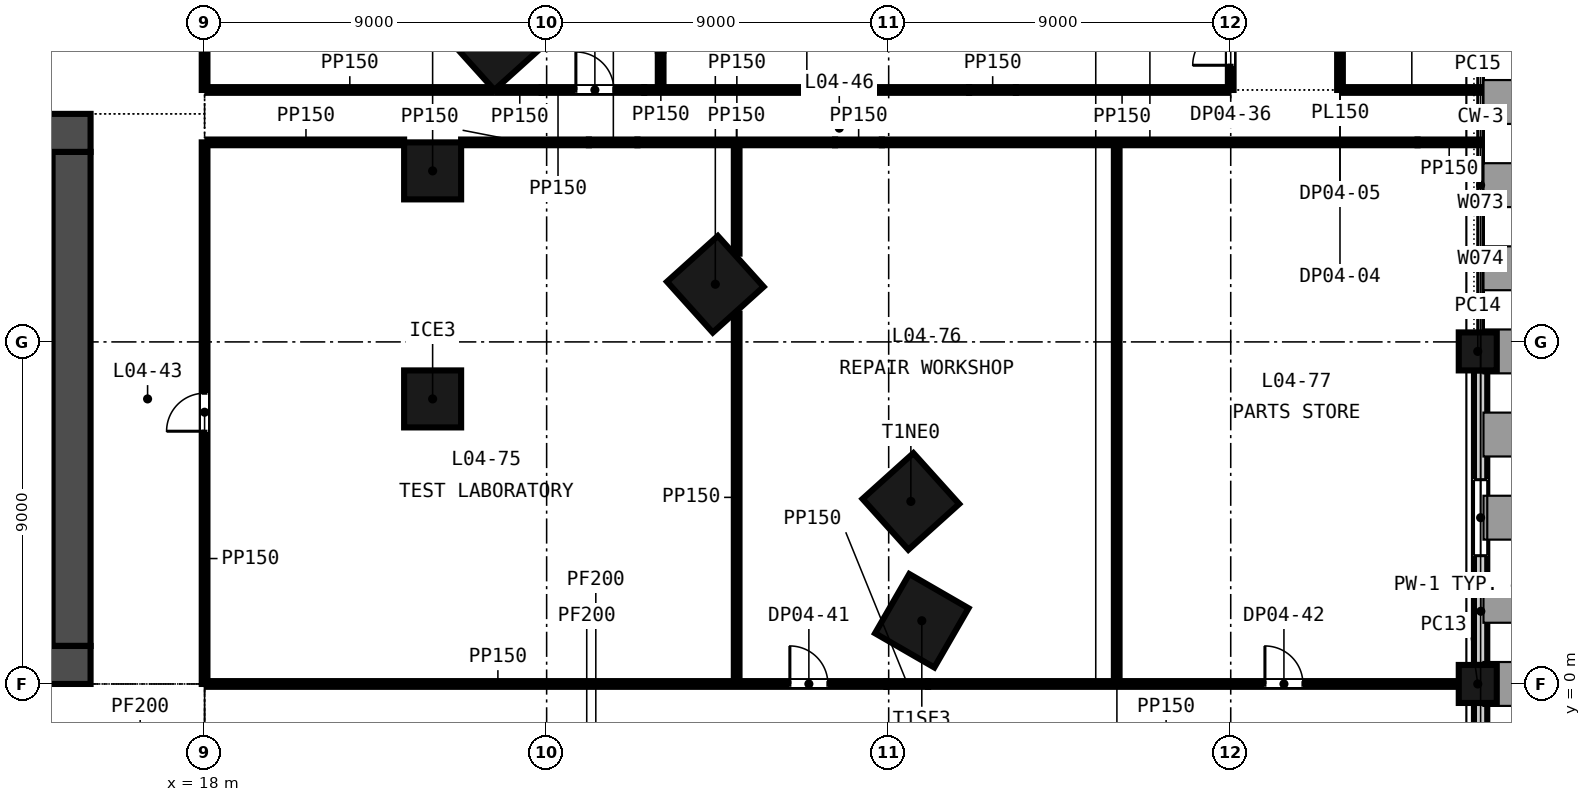
"""IFC4 building model, lengths in metres.
Left out: names, types, materials, properties, quantities, classifications, styles, units other than length and angle.
Written with IfcOpenShell. Run it as: python <this file> out.ifc"""

import sys

from ifc_helpers import new_model, si_unit, direction, frame, frame_2d, origin, origin_2d, place, context, subcontext, project, spatial, rectangle, extrude, element, fill, save


model = new_model("IFC4")
c1 = context("Model", 3, precision=1e-05, world=origin(), true_north=direction((0.0, 1.0)))
c2 = subcontext(c1, "Body", "Model", "MODEL_VIEW")
j1 = project(units=[si_unit("LENGTHUNIT", "METRE"), si_unit("PLANEANGLEUNIT", "RADIAN")], contexts=[c1])
p1 = place(None, origin())
s1 = spatial("IfcSite", under=j1, at=p1, CompositionType="ELEMENT")
p2 = place(p1, origin())
s2 = spatial("IfcBuilding", under=s1, at=p2, CompositionType="ELEMENT")
p3 = place(p2, frame((0.0, 0.0, 27.0)))
s3 = spatial("IfcBuildingStorey", under=s2, at=p3, CompositionType="ELEMENT", Elevation=27.0)
p4 = place(p3, frame((-15.0, 0.5, -0.3), z_axis=(0.0, 0.0, 1.0), x_axis=(1.0, 0.0, 0.0)))
e1 = element("IfcWall", 1, at=p4, inside=s3, PredefinedType="SOLIDWALL", context=c2, shape_type="SweptSolid", body=[
    extrude(rectangle(XDim=30.0, YDim=1.0, at=frame_2d((15.0, 0.0))), origin(), (0.0, 0.0, 1.0), 4.5),
])
p5 = place(p4, frame((5.8, 0.0, 0.3)))
e2 = element("IfcOpeningElement", 2, at=p5, cuts=e1, PredefinedType="OPENING", context=c2, shape_type="SweptSolid", body=[
    extrude(rectangle(XDim=2.4, YDim=2.4, at=frame_2d((1.2, 1.2))), frame((0.0, 0.51, 0.0), z_axis=(0.0, -1.0, 0.0), x_axis=(1.0, 0.0, 0.0)), (0.0, 0.0, 1.0), 1.02),
])
p6 = place(p4, frame((13.8, 0.0, 0.3)))
e3 = element("IfcOpeningElement", 3, at=p6, cuts=e1, PredefinedType="OPENING", context=c2, shape_type="SweptSolid", body=[
    extrude(rectangle(XDim=2.4, YDim=2.4, at=frame_2d((1.2, 1.2))), frame((0.0, 0.51, 0.0), z_axis=(0.0, -1.0, 0.0), x_axis=(1.0, 0.0, 0.0)), (0.0, 0.0, 1.0), 1.02),
])
p7 = place(p4, frame((21.8, 0.0, 0.3)))
e4 = element("IfcOpeningElement", 4, at=p7, cuts=e1, PredefinedType="OPENING", context=c2, shape_type="SweptSolid", body=[
    extrude(rectangle(XDim=2.4, YDim=2.4, at=frame_2d((1.2, 1.2))), frame((0.0, 0.51, 0.0), z_axis=(0.0, -1.0, 0.0), x_axis=(1.0, 0.0, 0.0)), (0.0, 0.0, 1.0), 1.02),
])
p8 = place(p4, frame((1.5, 0.0, 0.3)))
e5 = element("IfcOpeningElement", 5, at=p8, cuts=e1, PredefinedType="OPENING", context=c2, shape_type="SweptSolid", body=[
    extrude(rectangle(XDim=1.2, YDim=2.1, at=frame_2d((0.6, 1.05))), frame((0.0, 0.51, 0.0), z_axis=(0.0, -1.0, 0.0), x_axis=(1.0, 0.0, 0.0)), (0.0, 0.0, 1.0), 1.02),
])
p9 = place(p4, frame((27.3, 0.0, 0.3)))
e6 = element("IfcOpeningElement", 6, at=p9, cuts=e1, PredefinedType="OPENING", context=c2, shape_type="SweptSolid", body=[
    extrude(rectangle(XDim=1.2, YDim=2.1, at=frame_2d((0.6, 1.05))), frame((0.0, 0.51, 0.0), z_axis=(0.0, -1.0, 0.0), x_axis=(1.0, 0.0, 0.0)), (0.0, 0.0, 1.0), 1.02),
])
p10 = place(p3, frame((-15.0, 14.5, -0.3), z_axis=(0.0, 0.0, 1.0), x_axis=(1.0, 0.0, 0.0)))
e7 = element("IfcWall", 7, at=p10, inside=s3, PredefinedType="SOLIDWALL", context=c2, shape_type="SweptSolid", body=[
    extrude(rectangle(XDim=30.0, YDim=1.0, at=frame_2d((15.0, 0.0))), origin(), (0.0, 0.0, 1.0), 4.5),
])
p11 = place(p10, frame((9.25, 0.0, 0.3)))
e8 = element("IfcOpeningElement", 8, at=p11, cuts=e7, PredefinedType="OPENING", context=c2, shape_type="SweptSolid", body=[
    extrude(rectangle(XDim=1.5, YDim=2.1, at=frame_2d((0.75, 1.05))), frame((0.0, 0.51, 0.0), z_axis=(0.0, -1.0, 0.0), x_axis=(1.0, 0.0, 0.0)), (0.0, 0.0, 1.0), 1.02),
])
p12 = place(p10, frame((19.4, 0.0, 0.3)))
e9 = element("IfcOpeningElement", 9, at=p12, cuts=e7, PredefinedType="OPENING", context=c2, shape_type="SweptSolid", body=[
    extrude(rectangle(XDim=1.5, YDim=2.1, at=frame_2d((0.75, 1.05))), frame((0.0, 0.51, 0.0), z_axis=(0.0, -1.0, 0.0), x_axis=(1.0, 0.0, 0.0)), (0.0, 0.0, 1.0), 1.02),
])
p13 = place(p10, frame((1.5, 0.0, 0.3)))
e10 = element("IfcOpeningElement", 10, at=p13, cuts=e7, PredefinedType="OPENING", context=c2, shape_type="SweptSolid", body=[
    extrude(rectangle(XDim=1.2, YDim=2.1, at=frame_2d((0.6, 1.05))), frame((0.0, 0.51, 0.0), z_axis=(0.0, -1.0, 0.0), x_axis=(1.0, 0.0, 0.0)), (0.0, 0.0, 1.0), 1.02),
])
p14 = place(p10, frame((27.3, 0.0, 0.3)))
e11 = element("IfcOpeningElement", 11, at=p14, cuts=e7, PredefinedType="OPENING", context=c2, shape_type="SweptSolid", body=[
    extrude(rectangle(XDim=1.2, YDim=2.1, at=frame_2d((0.6, 1.05))), frame((0.0, 0.51, 0.0), z_axis=(0.0, -1.0, 0.0), x_axis=(1.0, 0.0, 0.0)), (0.0, 0.0, 1.0), 1.02),
])
p15 = place(p3, frame((14.5, 1.0, -0.3), z_axis=(0.0, 0.0, 1.0), x_axis=(0.0, 1.0, 0.0)))
e12 = element("IfcWall", 12, at=p15, inside=s3, PredefinedType="SOLIDWALL", context=c2, shape_type="SweptSolid", body=[
    extrude(rectangle(XDim=13.0, YDim=1.0, at=frame_2d((6.5, 0.0))), origin(), (0.0, 0.0, 1.0), 4.5),
])
for number, where, z_axis, x_axis in (
    (13, (36.872, 1.663, -0.3), (0.0, 0.0, 1.0), (0.5, 0.866, 0.0)),
    (14, (36.584, 4.803, -0.3), (0.0, 0.0, 1.0), (-0.669, 0.743, 0.0)),
    (15, (31.438, 10.517, -0.3), (0.0, 0.0, 1.0), (-0.669, 0.743, 0.0)),
    (16, (25.691, 16.9, -0.3), (0.0, 0.0, 1.0), (-0.669, 0.743, 0.0)),
):
    element("IfcColumn", number, at=place(p3, frame(where, z_axis=z_axis, x_axis=x_axis)), inside=s3, PredefinedType="COLUMN", context=c2, shape_type="SweptSolid", body=[
        extrude(rectangle(XDim=1.8, YDim=1.8, at=origin_2d()), origin(), (0.0, 0.0, 1.0), 4.5),
    ])
for number, where, z_axis, x_axis in (
    (17, (24.0, 7.5, -0.3), (0.0, 0.0, 1.0), (1.0, 0.0, 0.0)),
    (18, (24.0, 13.5, -0.3), (0.0, 0.0, 1.0), (1.0, 0.0, 0.0)),
):
    element("IfcColumn", number, at=place(p3, frame(where, z_axis=z_axis, x_axis=x_axis)), inside=s3, PredefinedType="COLUMN", context=c2, shape_type="SweptSolid", body=[
        extrude(rectangle(XDim=1.5, YDim=1.5, at=origin_2d()), origin(), (0.0, 0.0, 1.0), 4.5),
    ])
for number, where, z_axis, x_axis in (
    (19, (51.5, 0.0, -0.3), (0.0, 0.0, 1.0), (0.0, 1.0, 0.0)),
    (20, (51.5, 8.75, -0.3), (0.0, 0.0, 1.0), (0.0, 1.0, 0.0)),
):
    element("IfcColumn", number, at=place(p3, frame(where, z_axis=z_axis, x_axis=x_axis)), inside=s3, PredefinedType="COLUMN", context=c2, shape_type="SweptSolid", body=[
        extrude(rectangle(XDim=1.0, YDim=1.0, at=origin_2d()), origin(), (0.0, 0.0, 1.0), 4.5),
    ])
p16 = place(p3, frame((51.575, -8.2, -0.3), z_axis=(0.0, 0.0, 1.0), x_axis=(0.0, 1.0, 0.0)))
e21 = element("IfcWall", 21, at=p16, inside=s3, PredefinedType="SOLIDWALL", context=c2, shape_type="SweptSolid", body=[
    extrude(rectangle(XDim=7.7, YDim=0.35, at=frame_2d((3.85, 0.0))), origin(), (0.0, 0.0, 1.0), 3.6),
])
p17 = place(p16, frame((2.85, 0.0, 1.2)))
e22 = element("IfcOpeningElement", 22, at=p17, cuts=e21, PredefinedType="OPENING", context=c2, shape_type="SweptSolid", body=[
    extrude(rectangle(XDim=2.0, YDim=2.35, at=frame_2d((1.0, 1.175))), frame((0.0, 0.185, 0.0), z_axis=(0.0, -1.0, 0.0), x_axis=(1.0, 0.0, 0.0)), (0.0, 0.0, 1.0), 0.37),
])
p18 = place(p3, frame((51.575, 0.5, -0.3), z_axis=(0.0, 0.0, 1.0), x_axis=(0.0, 1.0, 0.0)))
e23 = element("IfcWall", 23, at=p18, inside=s3, PredefinedType="SOLIDWALL", context=c2, shape_type="SweptSolid", body=[
    extrude(rectangle(XDim=7.75, YDim=0.35, at=frame_2d((3.875, 0.0))), origin(), (0.0, 0.0, 1.0), 3.6),
])
p19 = place(p18, frame((2.875, 0.0, 1.2)))
e24 = element("IfcOpeningElement", 24, at=p19, cuts=e23, PredefinedType="OPENING", context=c2, shape_type="SweptSolid", body=[
    extrude(rectangle(XDim=2.0, YDim=2.35, at=frame_2d((1.0, 1.175))), frame((0.0, 0.185, 0.0), z_axis=(0.0, -1.0, 0.0), x_axis=(1.0, 0.0, 0.0)), (0.0, 0.0, 1.0), 0.37),
])
p20 = place(p3, frame((11.05, 7.35, -0.3), z_axis=(0.0, 0.0, 1.0), x_axis=(1.0, 0.0, 0.0)))
e25 = element("IfcWall", 25, at=p20, inside=s3, PredefinedType="SOLIDWALL", context=c2, shape_type="SweptSolid", body=[
    extrude(rectangle(XDim=2.95, YDim=0.3, at=frame_2d((1.475, 0.0))), origin(), (0.0, 0.0, 1.0), 4.5),
])
p21 = place(p3, frame((18.075, 0.0, 0.0), z_axis=(0.0, 0.0, 1.0), x_axis=(1.0, 0.0, 0.0)))
e26 = element("IfcWall", 26, at=p21, inside=s3, PredefinedType="PARTITIONING", context=c2, shape_type="SweptSolid", body=[
    extrude(rectangle(XDim=17.865, YDim=0.15, at=frame_2d((8.933, 0.0))), origin(), (0.0, 0.0, 1.0), 4.2),
])
p22 = place(p21, frame((15.325, 0.0, 0.0)))
e27 = element("IfcOpeningElement", 27, at=p22, cuts=e26, PredefinedType="OPENING", context=c2, shape_type="SweptSolid", body=[
    extrude(rectangle(XDim=1.0, YDim=2.1, at=frame_2d((0.5, 1.05))), frame((0.0, 0.085, 0.0), z_axis=(0.0, -1.0, 0.0), x_axis=(1.0, 0.0, 0.0)), (0.0, 0.0, 1.0), 0.17),
])
p23 = place(p3, frame((35.94, 0.0, 0.0), z_axis=(0.0, 0.0, 1.0), x_axis=(1.0, 0.0, 0.0)))
e28 = element("IfcWall", 28, at=p23, inside=s3, PredefinedType="PARTITIONING", context=c2, shape_type="SweptSolid", body=[
    extrude(rectangle(XDim=1.097, YDim=0.15, at=frame_2d((0.548, 0.0))), origin(), (0.0, 0.0, 1.0), 3.2),
])
p24 = place(p3, frame((37.037, 0.0, 0.0), z_axis=(0.0, 0.0, 1.0), x_axis=(1.0, 0.0, 0.0)))
e29 = element("IfcWall", 29, at=p24, inside=s3, PredefinedType="PARTITIONING", context=c2, shape_type="SweptSolid", body=[
    extrude(rectangle(XDim=13.963, YDim=0.15, at=frame_2d((6.981, 0.0))), origin(), (0.0, 0.0, 1.0), 4.2),
])
p25 = place(p24, frame((8.863, 0.0, 0.0)))
e30 = element("IfcOpeningElement", 30, at=p25, cuts=e29, PredefinedType="OPENING", context=c2, shape_type="SweptSolid", body=[
    extrude(rectangle(XDim=1.0, YDim=2.1, at=frame_2d((0.5, 1.05))), frame((0.0, 0.085, 0.0), z_axis=(0.0, -1.0, 0.0), x_axis=(1.0, 0.0, 0.0)), (0.0, 0.0, 1.0), 0.17),
])
p26 = place(p3, frame((18.075, 14.25, 0.0), z_axis=(0.0, 0.0, 1.0), x_axis=(1.0, 0.0, 0.0)))
e31 = element("IfcWall", 31, at=p26, inside=s3, PredefinedType="PARTITIONING", context=c2, shape_type="SweptSolid", body=[
    extrude(rectangle(XDim=5.175, YDim=0.15, at=frame_2d((2.587, 0.0))), origin(), (0.0, 0.0, 1.0), 4.2),
])
p27 = place(p3, frame((24.75, 14.25, 0.0), z_axis=(0.0, 0.0, 1.0), x_axis=(1.0, 0.0, 0.0)))
e32 = element("IfcWall", 32, at=p27, inside=s3, PredefinedType="PARTITIONING", context=c2, shape_type="SweptSolid", body=[
    extrude(rectangle(XDim=3.361, YDim=0.15, at=frame_2d((1.681, 0.0))), origin(), (0.0, 0.0, 1.0), 4.2),
])
p28 = place(p3, frame((28.111, 14.25, 0.0), z_axis=(0.0, 0.0, 1.0), x_axis=(1.0, 0.0, 0.0)))
e33 = element("IfcWall", 33, at=p28, inside=s3, PredefinedType="PARTITIONING", context=c2, shape_type="SweptSolid", body=[
    extrude(rectangle(XDim=1.278, YDim=0.15, at=frame_2d((0.639, 0.0))), origin(), (0.0, 0.0, 1.0), 3.2),
])
p29 = place(p3, frame((29.389, 14.25, 0.0), z_axis=(0.0, 0.0, 1.0), x_axis=(1.0, 0.0, 0.0)))
e34 = element("IfcWall", 34, at=p29, inside=s3, PredefinedType="PARTITIONING", context=c2, shape_type="SweptSolid", body=[
    extrude(rectangle(XDim=5.2, YDim=0.15, at=frame_2d((2.6, 0.0))), origin(), (0.0, 0.0, 1.0), 4.2),
])
p30 = place(p3, frame((34.589, 14.25, 0.0), z_axis=(0.0, 0.0, 1.0), x_axis=(1.0, 0.0, 0.0)))
e35 = element("IfcWall", 35, at=p30, inside=s3, PredefinedType="PARTITIONING", context=c2, shape_type="SweptSolid", body=[
    extrude(rectangle(XDim=1.231, YDim=0.15, at=frame_2d((0.616, 0.0))), origin(), (0.0, 0.0, 1.0), 3.219),
])
p31 = place(p3, frame((35.82, 14.25, 0.0), z_axis=(0.0, 0.0, 1.0), x_axis=(1.0, 0.0, 0.0)))
e36 = element("IfcWall", 36, at=p31, inside=s3, PredefinedType="PARTITIONING", context=c2, shape_type="SweptSolid", body=[
    extrude(rectangle(XDim=14.096, YDim=0.15, at=frame_2d((7.048, 0.0))), origin(), (0.0, 0.0, 1.0), 4.2),
])
p32 = place(p3, frame((49.916, 14.25, 0.0), z_axis=(0.0, 0.0, 1.0), x_axis=(1.0, 0.0, 0.0)))
e37 = element("IfcWall", 37, at=p32, inside=s3, PredefinedType="PARTITIONING", context=c2, shape_type="SweptSolid", body=[
    extrude(rectangle(XDim=1.654, YDim=0.15, at=frame_2d((0.827, 0.0))), origin(), (0.0, 0.0, 1.0), 3.298),
])
p33 = place(p3, frame((18.075, 15.629, 0.0), z_axis=(0.0, 0.0, 1.0), x_axis=(1.0, 0.0, 0.0)))
e38 = element("IfcWall", 38, at=p33, inside=s3, PredefinedType="PARTITIONING", context=c2, shape_type="SweptSolid", body=[
    extrude(rectangle(XDim=7.482, YDim=0.15, at=frame_2d((3.741, 0.0))), origin(), (0.0, 0.0, 1.0), 4.2),
])
p34 = place(p3, frame((25.708, 15.629, 0.0), z_axis=(0.0, 0.0, 1.0), x_axis=(1.0, 0.0, 0.0)))
e39 = element("IfcWall", 39, at=p34, inside=s3, PredefinedType="PARTITIONING", context=c2, shape_type="SweptSolid", body=[
    extrude(rectangle(XDim=1.162, YDim=0.15, at=frame_2d((0.581, 0.0))), origin(), (0.0, 0.0, 1.0), 4.2),
])
p35 = place(p3, frame((26.869, 15.629, 0.0), z_axis=(0.0, 0.0, 1.0), x_axis=(1.0, 0.0, 0.0)))
e40 = element("IfcWall", 40, at=p35, inside=s3, PredefinedType="PARTITIONING", context=c2, shape_type="SweptSolid", body=[
    extrude(rectangle(XDim=2.698, YDim=0.15, at=frame_2d((1.349, 0.0))), origin(), (0.0, 0.0, 1.0), 3.111),
])
p36 = place(p35, frame((0.9, 0.0, 0.0)))
e41 = element("IfcOpeningElement", 41, at=p36, cuts=e40, PredefinedType="OPENING", context=c2, shape_type="SweptSolid", body=[
    extrude(rectangle(XDim=1.0, YDim=2.1, at=frame_2d((0.5, 1.05))), frame((0.0, 0.085, 0.0), z_axis=(0.0, -1.0, 0.0), x_axis=(1.0, 0.0, 0.0)), (0.0, 0.0, 1.0), 0.17),
])
p37 = place(p3, frame((29.567, 15.629, 0.0), z_axis=(0.0, 0.0, 1.0), x_axis=(1.0, 0.0, 0.0)))
e42 = element("IfcWall", 42, at=p37, inside=s3, PredefinedType="PARTITIONING", context=c2, shape_type="SweptSolid", body=[
    extrude(rectangle(XDim=8.548, YDim=0.15, at=frame_2d((4.274, 0.0))), origin(), (0.0, 0.0, 1.0), 4.2),
])
p38 = place(p3, frame((38.116, 15.629, 0.0), z_axis=(0.0, 0.0, 1.0), x_axis=(1.0, 0.0, 0.0)))
e43 = element("IfcWall", 43, at=p38, inside=s3, PredefinedType="PARTITIONING", context=c2, shape_type="SweptSolid", body=[
    extrude(rectangle(XDim=1.231, YDim=0.15, at=frame_2d((0.616, 0.0))), origin(), (0.0, 0.0, 1.0), 3.219),
])
p39 = place(p3, frame((39.347, 15.629, 0.0), z_axis=(0.0, 0.0, 1.0), x_axis=(1.0, 0.0, 0.0)))
e44 = element("IfcWall", 44, at=p39, inside=s3, PredefinedType="PARTITIONING", context=c2, shape_type="SweptSolid", body=[
    extrude(rectangle(XDim=5.578, YDim=0.15, at=frame_2d((2.789, 0.0))), origin(), (0.0, 0.0, 1.0), 4.2),
])
p40 = place(p3, frame((47.95, 15.629, 0.0), z_axis=(0.0, 0.0, 1.0), x_axis=(1.0, 0.0, 0.0)))
e45 = element("IfcWall", 45, at=p40, inside=s3, PredefinedType="PARTITIONING", context=c2, shape_type="SweptSolid", body=[
    extrude(rectangle(XDim=3.62, YDim=0.15, at=frame_2d((1.81, 0.0))), origin(), (0.0, 0.0, 1.0), 4.2),
])
p41 = place(p3, frame((18.0, 0.0, 0.0), z_axis=(0.0, 0.0, 1.0), x_axis=(0.0, 1.0, 0.0)))
e46 = element("IfcWall", 46, at=p41, inside=s3, PredefinedType="PARTITIONING", context=c2, shape_type="SweptSolid", body=[
    extrude(rectangle(XDim=14.25, YDim=0.15, at=frame_2d((7.125, 0.0))), origin(), (0.0, 0.0, 1.0), 4.2),
])
p42 = place(p41, frame((6.65, 0.0, 0.0)))
e47 = element("IfcOpeningElement", 47, at=p42, cuts=e46, PredefinedType="OPENING", context=c2, shape_type="SweptSolid", body=[
    extrude(rectangle(XDim=1.0, YDim=2.1, at=frame_2d((0.5, 1.05))), frame((0.0, 0.085, 0.0), z_axis=(0.0, -1.0, 0.0), x_axis=(1.0, 0.0, 0.0)), (0.0, 0.0, 1.0), 0.17),
])
p43 = place(p3, frame((18.0, 15.629, 0.0), z_axis=(0.0, 0.0, 1.0), x_axis=(0.0, 1.0, 0.0)))
e48 = element("IfcWall", 48, at=p43, inside=s3, PredefinedType="PARTITIONING", context=c2, shape_type="SweptSolid", body=[
    extrude(rectangle(XDim=9.85, YDim=0.15, at=frame_2d((4.925, 0.0))), origin(), (0.0, 0.0, 1.0), 4.2),
])
p44 = place(p3, frame((30.0, 15.704, 0.0), z_axis=(0.0, 0.0, 1.0), x_axis=(0.0, 1.0, 0.0)))
e49 = element("IfcWall", 49, at=p44, inside=s3, PredefinedType="PARTITIONING", context=c2, shape_type="SweptSolid", body=[
    extrude(rectangle(XDim=0.96, YDim=0.15, at=frame_2d((0.48, 0.0))), origin(), (0.0, 0.0, 1.0), 3.111),
])
p45 = place(p3, frame((32.0, 0.075, 0.0), z_axis=(0.0, 0.0, 1.0), x_axis=(0.0, 1.0, 0.0)))
e50 = element("IfcWall", 50, at=p45, inside=s3, PredefinedType="PARTITIONING", context=c2, shape_type="SweptSolid", body=[
    extrude(rectangle(XDim=9.669, YDim=0.15, at=frame_2d((4.834, 0.0))), origin(), (0.0, 0.0, 1.0), 4.2),
])
p46 = place(p3, frame((32.0, 11.322, 0.0), z_axis=(0.0, 0.0, 1.0), x_axis=(0.0, 1.0, 0.0)))
e51 = element("IfcWall", 51, at=p46, inside=s3, PredefinedType="PARTITIONING", context=c2, shape_type="SweptSolid", body=[
    extrude(rectangle(XDim=2.853, YDim=0.15, at=frame_2d((1.427, 0.0))), origin(), (0.0, 0.0, 1.0), 4.2),
])
p47 = place(p3, frame((42.0, 0.075, 0.0), z_axis=(0.0, 0.0, 1.0), x_axis=(0.0, 1.0, 0.0)))
e52 = element("IfcWall", 52, at=p47, inside=s3, PredefinedType="PARTITIONING", context=c2, shape_type="SweptSolid", body=[
    extrude(rectangle(XDim=14.1, YDim=0.15, at=frame_2d((7.05, 0.0))), origin(), (0.0, 0.0, 1.0), 4.2),
])
p48 = place(p3, frame((45.0, 15.629, 0.0), z_axis=(0.0, 0.0, 1.0), x_axis=(0.0, 1.0, 0.0)))
e53 = element("IfcWall", 53, at=p48, inside=s3, PredefinedType="PARTITIONING", context=c2, shape_type="SweptSolid", body=[
    extrude(rectangle(XDim=7.829, YDim=0.15, at=frame_2d((3.915, 0.0))), origin(), (0.0, 0.0, 1.0), 4.2),
])
p49 = place(p48, frame((0.65, 0.0, 0.0)))
e54 = element("IfcOpeningElement", 54, at=p49, cuts=e53, PredefinedType="OPENING", context=c2, shape_type="SweptSolid", body=[
    extrude(rectangle(XDim=1.0, YDim=2.1, at=frame_2d((0.5, 1.05))), frame((0.0, 0.085, 0.0), z_axis=(0.0, -1.0, 0.0), x_axis=(1.0, 0.0, 0.0)), (0.0, 0.0, 1.0), 0.17),
])
p50 = place(p3, frame((47.875, 15.629, 0.0), z_axis=(0.0, 0.0, 1.0), x_axis=(0.0, 1.0, 0.0)))
e55 = element("IfcWall", 55, at=p50, inside=s3, PredefinedType="PARTITIONING", context=c2, shape_type="SweptSolid", body=[
    extrude(rectangle(XDim=9.323, YDim=0.15, at=frame_2d((4.661, 0.0))), origin(), (0.0, 0.0, 1.0), 4.2),
])
p51 = place(p50, frame((6.021, 0.0, 0.0)))
e56 = element("IfcOpeningElement", 56, at=p51, cuts=e55, PredefinedType="OPENING", context=c2, shape_type="SweptSolid", body=[
    extrude(rectangle(XDim=0.9, YDim=2.1, at=frame_2d((0.45, 1.05))), frame((0.0, 0.085, 0.0), z_axis=(0.0, -1.0, 0.0), x_axis=(1.0, 0.0, 0.0)), (0.0, 0.0, 1.0), 0.17),
])
p52 = place(p19, origin())
e57 = element("IfcWindow", 57, at=p52, inside=s3, PartitioningType="SINGLE_PANEL", PredefinedType="WINDOW", context=c2, shape_type="SweptSolid", body=[
    extrude(rectangle(XDim=2.0, YDim=2.35, at=frame_2d((1.0, 1.175))), frame((0.0, 0.03, 0.0), z_axis=(0.0, -1.0, 0.0), x_axis=(1.0, 0.0, 0.0)), (0.0, 0.0, 1.0), 0.06),
])
fill(e24, e57)
p53 = place(p36, origin())
e58 = element("IfcDoor", 58, at=p53, inside=s3, OperationType="SINGLE_SWING_LEFT", PredefinedType="DOOR", context=c2, shape_type="SweptSolid", body=[
    extrude(rectangle(XDim=1.0, YDim=2.1, at=frame_2d((0.5, 1.05))), frame((0.0, 0.025, 0.0), z_axis=(0.0, -1.0, 0.0), x_axis=(1.0, 0.0, 0.0)), (0.0, 0.0, 1.0), 0.05),
])
fill(e41, e58)
p54 = place(p49, origin())
e59 = element("IfcDoor", 59, at=p54, inside=s3, OperationType="SINGLE_SWING_LEFT", PredefinedType="DOOR", context=c2, shape_type="SweptSolid", body=[
    extrude(rectangle(XDim=1.0, YDim=2.1, at=frame_2d((0.5, 1.05))), frame((0.0, 0.025, 0.0), z_axis=(0.0, -1.0, 0.0), x_axis=(1.0, 0.0, 0.0)), (0.0, 0.0, 1.0), 0.05),
])
fill(e54, e59)
p55 = place(p42, origin())
e60 = element("IfcDoor", 60, at=p55, inside=s3, OperationType="SINGLE_SWING_LEFT", PredefinedType="DOOR", context=c2, shape_type="SweptSolid", body=[
    extrude(rectangle(XDim=1.0, YDim=2.1, at=frame_2d((0.5, 1.05))), frame((0.0, 0.025, 0.0), z_axis=(0.0, -1.0, 0.0), x_axis=(1.0, 0.0, 0.0)), (0.0, 0.0, 1.0), 0.05),
])
fill(e47, e60)
p56 = place(p22, origin())
e61 = element("IfcDoor", 61, at=p56, inside=s3, OperationType="SINGLE_SWING_LEFT", PredefinedType="DOOR", context=c2, shape_type="SweptSolid", body=[
    extrude(rectangle(XDim=1.0, YDim=2.1, at=frame_2d((0.5, 1.05))), frame((0.0, 0.025, 0.0), z_axis=(0.0, -1.0, 0.0), x_axis=(1.0, 0.0, 0.0)), (0.0, 0.0, 1.0), 0.05),
])
fill(e27, e61)
p57 = place(p25, origin())
e62 = element("IfcDoor", 62, at=p57, inside=s3, OperationType="SINGLE_SWING_LEFT", PredefinedType="DOOR", context=c2, shape_type="SweptSolid", body=[
    extrude(rectangle(XDim=1.0, YDim=2.1, at=frame_2d((0.5, 1.05))), frame((0.0, 0.025, 0.0), z_axis=(0.0, -1.0, 0.0), x_axis=(1.0, 0.0, 0.0)), (0.0, 0.0, 1.0), 0.05),
])
fill(e30, e62)
save(model, sys.argv[1])
